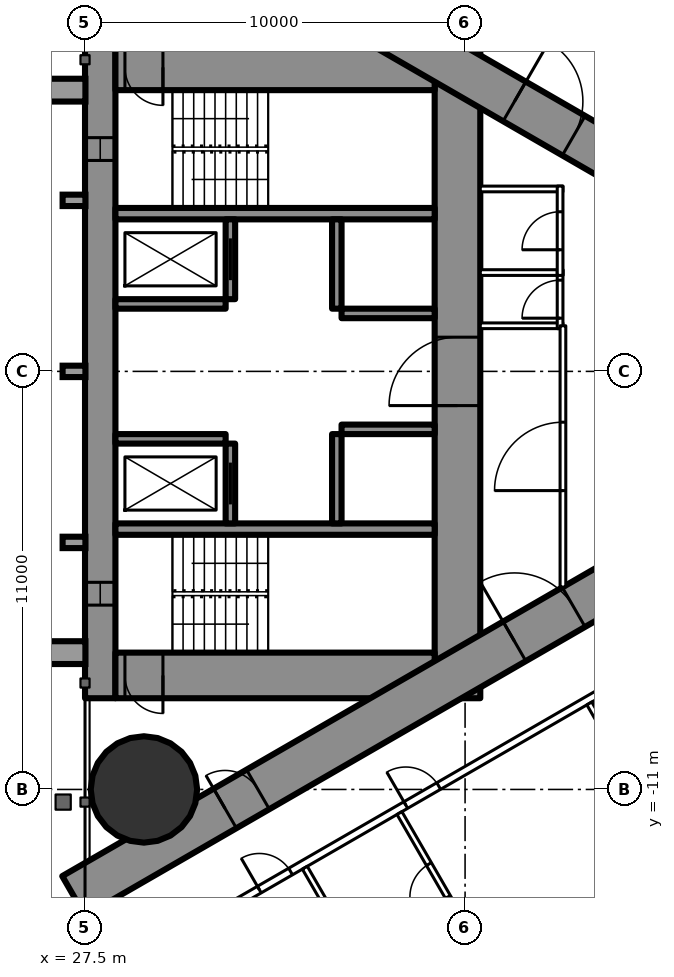
"""IFC4 building model, lengths in metres.
Left out: names, types, materials, properties, quantities, classifications, styles, units other than length and angle.
Written with IfcOpenShell. Run it as: python <this file> out.ifc"""

import sys

from ifc_helpers import new_model, si_unit, direction, frame, frame_2d, origin, origin_2d, place, context, subcontext, project, spatial, rectangle, circle, extrude, element, fill, save


model = new_model("IFC4")
c1 = context("Model", 3, precision=1e-05, world=origin(), true_north=direction((0.0, 1.0)))
c2 = subcontext(c1, "Body", "Model", "MODEL_VIEW")
j1 = project(units=[si_unit("LENGTHUNIT", "METRE"), si_unit("PLANEANGLEUNIT", "RADIAN")], contexts=[c1])
p1 = place(None, origin())
s1 = spatial("IfcSite", under=j1, at=p1, CompositionType="ELEMENT")
p2 = place(p1, origin())
s2 = spatial("IfcBuilding", under=s1, at=p2, CompositionType="ELEMENT")
p3 = place(p2, frame((0.0, 0.0, 170.3)))
s3 = spatial("IfcBuildingStorey", under=s2, at=p3, CompositionType="ELEMENT", Elevation=170.3)
p4 = place(p3, frame((29.05, -11.0, 0.0), z_axis=(0.0, 0.0, 1.0), x_axis=(1.0, 0.0, 0.0)))
e1 = element("IfcColumn", 1, at=p4, inside=s3, PredefinedType="COLUMN", context=c2, shape_type="SweptSolid", body=[
    extrude(circle(Radius=1.4, at=origin_2d()), origin(), (0.0, 0.0, 1.0), 3.5),
])
p5 = place(p3, frame((27.9, -8.6, 0.0), z_axis=(0.0, 0.0, 1.0), x_axis=(0.0, 1.0, 0.0)))
e2 = element("IfcWall", 2, at=p5, inside=s3, PredefinedType="SHEAR", context=c2, shape_type="SweptSolid", body=[
    extrude(rectangle(XDim=17.2, YDim=0.8, at=frame_2d((8.6, 0.0))), origin(), (0.0, 0.0, 1.0), 3.5),
])
p6 = place(p5, frame((2.45, 0.0, 0.6)))
e3 = element("IfcOpeningElement", 3, at=p6, cuts=e2, PredefinedType="OPENING", context=c2, shape_type="SweptSolid", body=[
    extrude(rectangle(XDim=0.6, YDim=2.1, at=frame_2d((0.3, 1.05))), frame((0.0, 0.41, 0.0), z_axis=(0.0, -1.0, 0.0), x_axis=(1.0, 0.0, 0.0)), (0.0, 0.0, 1.0), 0.82),
])
p7 = place(p5, frame((14.15, 0.0, 0.6)))
e4 = element("IfcOpeningElement", 4, at=p7, cuts=e2, PredefinedType="OPENING", context=c2, shape_type="SweptSolid", body=[
    extrude(rectangle(XDim=0.6, YDim=2.1, at=frame_2d((0.3, 1.05))), frame((0.0, 0.41, 0.0), z_axis=(0.0, -1.0, 0.0), x_axis=(1.0, 0.0, 0.0)), (0.0, 0.0, 1.0), 0.82),
])
p8 = place(p3, frame((37.3, -8.6, 0.0), z_axis=(0.0, 0.0, 1.0), x_axis=(0.0, 1.0, 0.0)))
e5 = element("IfcWall", 5, at=p8, inside=s3, PredefinedType="SHEAR", context=c2, shape_type="SweptSolid", body=[
    extrude(rectangle(XDim=17.2, YDim=1.2, at=frame_2d((8.6, 0.0))), origin(), (0.0, 0.0, 1.0), 3.5),
])
p9 = place(p8, frame((7.7, 0.0, 0.0)))
e6 = element("IfcOpeningElement", 6, at=p9, cuts=e5, PredefinedType="OPENING", context=c2, shape_type="SweptSolid", body=[
    extrude(rectangle(XDim=1.8, YDim=2.2, at=frame_2d((0.9, 1.1))), frame((0.0, 0.61, 0.0), z_axis=(0.0, -1.0, 0.0), x_axis=(1.0, 0.0, 0.0)), (0.0, 0.0, 1.0), 1.22),
])
p10 = place(p3, frame((28.3, -8.0, 0.0), z_axis=(0.0, 0.0, 1.0), x_axis=(1.0, 0.0, 0.0)))
e7 = element("IfcWall", 7, at=p10, inside=s3, PredefinedType="SHEAR", context=c2, shape_type="SweptSolid", body=[
    extrude(rectangle(XDim=8.4, YDim=1.2, at=frame_2d((4.2, 0.0))), origin(), (0.0, 0.0, 1.0), 3.5),
])
p11 = place(p10, frame((0.25, 0.0, 0.0)))
e8 = element("IfcOpeningElement", 8, at=p11, cuts=e7, PredefinedType="OPENING", context=c2, shape_type="SweptSolid", body=[
    extrude(rectangle(XDim=1.0, YDim=2.2, at=frame_2d((0.5, 1.1))), frame((0.0, 0.61, 0.0), z_axis=(0.0, -1.0, 0.0), x_axis=(1.0, 0.0, 0.0)), (0.0, 0.0, 1.0), 1.22),
])
p12 = place(p3, frame((28.3, 8.0, 0.0), z_axis=(0.0, 0.0, 1.0), x_axis=(1.0, 0.0, 0.0)))
e9 = element("IfcWall", 9, at=p12, inside=s3, PredefinedType="SHEAR", context=c2, shape_type="SweptSolid", body=[
    extrude(rectangle(XDim=8.4, YDim=1.2, at=frame_2d((4.2, 0.0))), origin(), (0.0, 0.0, 1.0), 3.5),
])
p13 = place(p12, frame((0.25, 0.0, 0.0)))
e10 = element("IfcOpeningElement", 10, at=p13, cuts=e9, PredefinedType="OPENING", context=c2, shape_type="SweptSolid", body=[
    extrude(rectangle(XDim=1.0, YDim=2.2, at=frame_2d((0.5, 1.1))), frame((0.0, 0.61, 0.0), z_axis=(0.0, -1.0, 0.0), x_axis=(1.0, 0.0, 0.0)), (0.0, 0.0, 1.0), 1.22),
])
for number, where, z_axis, x_axis in (
    (11, (28.3, -4.15, 0.0), (0.0, 0.0, 1.0), (1.0, 0.0, 0.0)),
    (12, (28.3, 4.15, 0.0), (0.0, 0.0, 1.0), (1.0, 0.0, 0.0)),
):
    element("IfcWall", number, at=place(p3, frame(where, z_axis=z_axis, x_axis=x_axis)), inside=s3, PredefinedType="SHEAR", context=c2, shape_type="SweptSolid", body=[
        extrude(rectangle(XDim=8.4, YDim=0.3, at=frame_2d((4.2, 0.0))), origin(), (0.0, 0.0, 1.0), 3.5),
    ])
p14 = place(p3, frame((31.325, -4.0, 0.0), z_axis=(0.0, 0.0, 1.0), x_axis=(0.0, 1.0, 0.0)))
e13 = element("IfcWall", 13, at=p14, inside=s3, PredefinedType="SHEAR", context=c2, shape_type="SweptSolid", body=[
    extrude(rectangle(XDim=2.1, YDim=0.25, at=frame_2d((1.05, 0.0))), origin(), (0.0, 0.0, 1.0), 3.5),
])
p15 = place(p14, frame((0.5, 0.0, 0.0)))
e14 = element("IfcOpeningElement", 14, at=p15, cuts=e13, PredefinedType="OPENING", context=c2, shape_type="SweptSolid", body=[
    extrude(rectangle(XDim=1.1, YDim=2.2, at=frame_2d((0.55, 1.1))), frame((0.0, 0.135, 0.0), z_axis=(0.0, -1.0, 0.0), x_axis=(1.0, 0.0, 0.0)), (0.0, 0.0, 1.0), 0.27),
])
p16 = place(p3, frame((34.125, -4.0, 0.0), z_axis=(0.0, 0.0, 1.0), x_axis=(0.0, 1.0, 0.0)))
e15 = element("IfcWall", 15, at=p16, inside=s3, PredefinedType="SHEAR", context=c2, shape_type="SweptSolid", body=[
    extrude(rectangle(XDim=2.35, YDim=0.25, at=frame_2d((1.175, 0.0))), origin(), (0.0, 0.0, 1.0), 3.5),
])
p17 = place(p3, frame((28.3, -1.775, 0.0), z_axis=(0.0, 0.0, 1.0), x_axis=(1.0, 0.0, 0.0)))
e16 = element("IfcWall", 16, at=p17, inside=s3, PredefinedType="SHEAR", context=c2, shape_type="SweptSolid", body=[
    extrude(rectangle(XDim=2.9, YDim=0.25, at=frame_2d((1.45, 0.0))), origin(), (0.0, 0.0, 1.0), 3.5),
])
p18 = place(p3, frame((34.25, -1.525, 0.0), z_axis=(0.0, 0.0, 1.0), x_axis=(1.0, 0.0, 0.0)))
e17 = element("IfcWall", 17, at=p18, inside=s3, PredefinedType="SHEAR", context=c2, shape_type="SweptSolid", body=[
    extrude(rectangle(XDim=2.45, YDim=0.25, at=frame_2d((1.225, 0.0))), origin(), (0.0, 0.0, 1.0), 3.5),
])
p19 = place(p3, frame((31.325, 1.9, 0.0), z_axis=(0.0, 0.0, 1.0), x_axis=(0.0, 1.0, 0.0)))
e18 = element("IfcWall", 18, at=p19, inside=s3, PredefinedType="SHEAR", context=c2, shape_type="SweptSolid", body=[
    extrude(rectangle(XDim=2.1, YDim=0.25, at=frame_2d((1.05, 0.0))), origin(), (0.0, 0.0, 1.0), 3.5),
])
p20 = place(p19, frame((0.5, 0.0, 0.0)))
e19 = element("IfcOpeningElement", 19, at=p20, cuts=e18, PredefinedType="OPENING", context=c2, shape_type="SweptSolid", body=[
    extrude(rectangle(XDim=1.1, YDim=2.2, at=frame_2d((0.55, 1.1))), frame((0.0, 0.135, 0.0), z_axis=(0.0, -1.0, 0.0), x_axis=(1.0, 0.0, 0.0)), (0.0, 0.0, 1.0), 0.27),
])
p21 = place(p3, frame((34.125, 1.65, 0.0), z_axis=(0.0, 0.0, 1.0), x_axis=(0.0, 1.0, 0.0)))
e20 = element("IfcWall", 20, at=p21, inside=s3, PredefinedType="SHEAR", context=c2, shape_type="SweptSolid", body=[
    extrude(rectangle(XDim=2.35, YDim=0.25, at=frame_2d((1.175, 0.0))), origin(), (0.0, 0.0, 1.0), 3.5),
])
p22 = place(p3, frame((28.3, 1.775, 0.0), z_axis=(0.0, 0.0, 1.0), x_axis=(1.0, 0.0, 0.0)))
e21 = element("IfcWall", 21, at=p22, inside=s3, PredefinedType="SHEAR", context=c2, shape_type="SweptSolid", body=[
    extrude(rectangle(XDim=2.9, YDim=0.25, at=frame_2d((1.45, 0.0))), origin(), (0.0, 0.0, 1.0), 3.5),
])
p23 = place(p3, frame((34.25, 1.525, 0.0), z_axis=(0.0, 0.0, 1.0), x_axis=(1.0, 0.0, 0.0)))
e22 = element("IfcWall", 22, at=p23, inside=s3, PredefinedType="SHEAR", context=c2, shape_type="SweptSolid", body=[
    extrude(rectangle(XDim=2.45, YDim=0.25, at=frame_2d((1.225, 0.0))), origin(), (0.0, 0.0, 1.0), 3.5),
])
p24 = place(p3, frame((27.2, -13.8, 0.0), z_axis=(0.0, 0.0, 1.0), x_axis=(0.866027159892, 0.499996958321, 0.0)))
e23 = element("IfcWall", 23, at=p24, inside=s3, PredefinedType="SHEAR", context=c2, shape_type="SweptSolid", body=[
    extrude(rectangle(XDim=27.947, YDim=1.2, at=frame_2d((13.973, 0.0))), origin(), (0.0, 0.0, 1.0), 3.5),
])
p25 = place(p24, frame((4.6, 0.0, 0.0)))
e24 = element("IfcOpeningElement", 24, at=p25, cuts=e23, PredefinedType="OPENING", context=c2, shape_type="SweptSolid", body=[
    extrude(rectangle(XDim=1.0, YDim=2.2, at=frame_2d((0.5, 1.1))), frame((0.0, 0.61, 0.0), z_axis=(0.0, -1.0, 0.0), x_axis=(1.0, 0.0, 0.0)), (0.0, 0.0, 1.0), 1.22),
])
p26 = place(p24, frame((13.395, 0.0, 0.0)))
e25 = element("IfcOpeningElement", 25, at=p26, cuts=e23, PredefinedType="OPENING", context=c2, shape_type="SweptSolid", body=[
    extrude(rectangle(XDim=1.8, YDim=2.2, at=frame_2d((0.9, 1.1))), frame((0.0, 0.61, 0.0), z_axis=(0.0, -1.0, 0.0), x_axis=(1.0, 0.0, 0.0)), (0.0, 0.0, 1.0), 1.22),
])
p27 = place(p3, frame((27.2, 13.8, 0.0), z_axis=(0.0, 0.0, 1.0), x_axis=(0.866024515034, -0.500001539357, 0.0)))
e26 = element("IfcWall", 26, at=p27, inside=s3, PredefinedType="SHEAR", context=c2, shape_type="SweptSolid", body=[
    extrude(rectangle(XDim=26.907, YDim=1.2, at=frame_2d((13.454, 0.0))), origin(), (0.0, 0.0, 1.0), 3.5),
])
p28 = place(p27, frame((4.6, 0.0, 0.0)))
e27 = element("IfcOpeningElement", 27, at=p28, cuts=e26, PredefinedType="OPENING", context=c2, shape_type="SweptSolid", body=[
    extrude(rectangle(XDim=1.0, YDim=2.2, at=frame_2d((0.5, 1.1))), frame((0.0, 0.61, 0.0), z_axis=(0.0, -1.0, 0.0), x_axis=(1.0, 0.0, 0.0)), (0.0, 0.0, 1.0), 1.22),
])
p29 = place(p27, frame((13.395, 0.0, 0.0)))
e28 = element("IfcOpeningElement", 28, at=p29, cuts=e26, PredefinedType="OPENING", context=c2, shape_type="SweptSolid", body=[
    extrude(rectangle(XDim=1.8, YDim=2.2, at=frame_2d((0.9, 1.1))), frame((0.0, 0.61, 0.0), z_axis=(0.0, -1.0, 0.0), x_axis=(1.0, 0.0, 0.0)), (0.0, 0.0, 1.0), 1.22),
])
p30 = place(p3, frame((27.959, -16.017, 0.0), z_axis=(0.0, 0.0, 1.0), x_axis=(0.866024151371, 0.500002169237, 0.0)))
e29 = element("IfcWall", 29, at=p30, inside=s3, PredefinedType="PARTITIONING", context=c2, shape_type="SweptSolid", body=[
    extrude(rectangle(XDim=32.034, YDim=0.2, at=frame_2d((16.017, 0.0))), origin(), (0.0, 0.0, 1.0), 3.25),
])
p31 = place(p30, frame((4.765, 0.0, 0.0)))
e30 = element("IfcOpeningElement", 30, at=p31, cuts=e29, PredefinedType="OPENING", context=c2, shape_type="SweptSolid", body=[
    extrude(rectangle(XDim=0.95, YDim=2.2, at=frame_2d((0.475, 1.1))), frame((0.0, 0.11, 0.0), z_axis=(0.0, -1.0, 0.0), x_axis=(1.0, 0.0, 0.0)), (0.0, 0.0, 1.0), 0.22),
])
p32 = place(p30, frame((9.215, 0.0, 0.0)))
e31 = element("IfcOpeningElement", 31, at=p32, cuts=e29, PredefinedType="OPENING", context=c2, shape_type="SweptSolid", body=[
    extrude(rectangle(XDim=1.0, YDim=2.2, at=frame_2d((0.5, 1.1))), frame((0.0, 0.11, 0.0), z_axis=(0.0, -1.0, 0.0), x_axis=(1.0, 0.0, 0.0)), (0.0, 0.0, 1.0), 0.22),
])
p33 = place(p30, frame((19.725, 0.0, 0.0)))
e32 = element("IfcOpeningElement", 32, at=p33, cuts=e29, PredefinedType="OPENING", context=c2, shape_type="SweptSolid", body=[
    extrude(rectangle(XDim=0.95, YDim=2.2, at=frame_2d((0.475, 1.1))), frame((0.0, 0.11, 0.0), z_axis=(0.0, -1.0, 0.0), x_axis=(1.0, 0.0, 0.0)), (0.0, 0.0, 1.0), 0.22),
])
p34 = place(p30, frame((26.125, 0.0, 0.0)))
e33 = element("IfcOpeningElement", 33, at=p34, cuts=e29, PredefinedType="OPENING", context=c2, shape_type="SweptSolid", body=[
    extrude(rectangle(XDim=0.95, YDim=2.2, at=frame_2d((0.475, 1.1))), frame((0.0, 0.11, 0.0), z_axis=(0.0, -1.0, 0.0), x_axis=(1.0, 0.0, 0.0)), (0.0, 0.0, 1.0), 0.22),
])
p35 = place(p30, frame((28.106, 0.0, 0.0)))
e34 = element("IfcOpeningElement", 34, at=p35, cuts=e29, PredefinedType="OPENING", context=c2, shape_type="SweptSolid", body=[
    extrude(rectangle(XDim=0.95, YDim=2.2, at=frame_2d((0.475, 1.1))), frame((0.0, 0.11, 0.0), z_axis=(0.0, -1.0, 0.0), x_axis=(1.0, 0.0, 0.0)), (0.0, 0.0, 1.0), 0.22),
])
p36 = place(p3, frame((33.284, -13.059, 0.0), z_axis=(0.0, 0.0, 1.0), x_axis=(0.499985904184, -0.866033541855, 0.0)))
e35 = element("IfcWall", 35, at=p36, inside=s3, PredefinedType="PARTITIONING", context=c2, shape_type="SweptSolid", body=[
    extrude(rectangle(XDim=9.385, YDim=0.15, at=frame_2d((4.693, 0.0))), origin(), (0.0, 0.0, 1.0), 3.25),
])
p37 = place(p3, frame((40.769, -8.737, 0.0), z_axis=(0.0, 0.0, 1.0), x_axis=(0.500013115284, -0.866017831539, 0.0)))
e36 = element("IfcWall", 36, at=p37, inside=s3, PredefinedType="PARTITIONING", context=c2, shape_type="SweptSolid", body=[
    extrude(rectangle(XDim=7.198, YDim=0.15, at=frame_2d((3.599, 0.0))), origin(), (0.0, 0.0, 1.0), 2.3),
])
p38 = place(p3, frame((35.773, -11.621, 0.0), z_axis=(0.0, 0.0, 1.0), x_axis=(0.49998411664, -0.866034573852, 0.0)))
e37 = element("IfcWall", 37, at=p38, inside=s3, PredefinedType="PARTITIONING", context=c2, shape_type="SweptSolid", body=[
    extrude(rectangle(XDim=2.8, YDim=0.15, at=frame_2d((1.4, 0.0))), origin(), (0.0, 0.0, 1.0), 3.25),
])
p39 = place(p38, frame((1.55, 0.0, 0.0)))
e38 = element("IfcOpeningElement", 38, at=p39, cuts=e37, PredefinedType="OPENING", context=c2, shape_type="SweptSolid", body=[
    extrude(rectangle(XDim=1.0, YDim=2.2, at=frame_2d((0.5, 1.1))), frame((0.0, 0.085, 0.0), z_axis=(0.0, -1.0, 0.0), x_axis=(1.0, 0.0, 0.0)), (0.0, 0.0, 1.0), 0.17),
])
for number, where, z_axis, x_axis in (
    (39, (37.9, 1.2, 0.0), (0.0, 0.0, 1.0), (1.0, 0.0, 0.0)),
    (40, (37.9, 2.6, 0.0), (0.0, 0.0, 1.0), (1.0, 0.0, 0.0)),
    (41, (37.9, 4.8, 0.0), (0.0, 0.0, 1.0), (1.0, 0.0, 0.0)),
):
    element("IfcWall", number, at=place(p3, frame(where, z_axis=z_axis, x_axis=x_axis)), inside=s3, PredefinedType="PARTITIONING", context=c2, shape_type="SweptSolid", body=[
        extrude(rectangle(XDim=2.175, YDim=0.15, at=frame_2d((1.087, 0.0))), origin(), (0.0, 0.0, 1.0), 3.25),
    ])
p40 = place(p3, frame((40.0, 1.125, 0.0), z_axis=(0.0, 0.0, 1.0), x_axis=(0.0, 1.0, 0.0)))
e42 = element("IfcWall", 42, at=p40, inside=s3, PredefinedType="PARTITIONING", context=c2, shape_type="SweptSolid", body=[
    extrude(rectangle(XDim=1.55, YDim=0.15, at=frame_2d((0.775, 0.0))), origin(), (0.0, 0.0, 1.0), 3.25),
])
p41 = place(p40, frame((0.275, 0.0, 0.0)))
e43 = element("IfcOpeningElement", 43, at=p41, cuts=e42, PredefinedType="OPENING", context=c2, shape_type="SweptSolid", body=[
    extrude(rectangle(XDim=1.0, YDim=2.2, at=frame_2d((0.5, 1.1))), frame((0.0, 0.085, 0.0), z_axis=(0.0, -1.0, 0.0), x_axis=(1.0, 0.0, 0.0)), (0.0, 0.0, 1.0), 0.17),
])
p42 = place(p3, frame((40.0, 2.525, 0.0), z_axis=(0.0, 0.0, 1.0), x_axis=(0.0, 1.0, 0.0)))
e44 = element("IfcWall", 44, at=p42, inside=s3, PredefinedType="PARTITIONING", context=c2, shape_type="SweptSolid", body=[
    extrude(rectangle(XDim=2.35, YDim=0.15, at=frame_2d((1.175, 0.0))), origin(), (0.0, 0.0, 1.0), 3.25),
])
p43 = place(p42, frame((0.675, 0.0, 0.0)))
e45 = element("IfcOpeningElement", 45, at=p43, cuts=e44, PredefinedType="OPENING", context=c2, shape_type="SweptSolid", body=[
    extrude(rectangle(XDim=1.0, YDim=2.2, at=frame_2d((0.5, 1.1))), frame((0.0, 0.085, 0.0), z_axis=(0.0, -1.0, 0.0), x_axis=(1.0, 0.0, 0.0)), (0.0, 0.0, 1.0), 0.17),
])
p44 = place(p3, frame((40.075, -5.674, 0.0), z_axis=(0.0, 0.0, 1.0), x_axis=(0.0, 1.0, 0.0)))
e46 = element("IfcWall", 46, at=p44, inside=s3, PredefinedType="PARTITIONING", context=c2, shape_type="SweptSolid", body=[
    extrude(rectangle(XDim=6.874, YDim=0.15, at=frame_2d((3.437, 0.0))), origin(), (0.0, 0.0, 1.0), 3.25),
])
p45 = place(p44, frame((2.537, 0.0, 0.0)))
e47 = element("IfcOpeningElement", 47, at=p45, cuts=e46, PredefinedType="OPENING", context=c2, shape_type="SweptSolid", body=[
    extrude(rectangle(XDim=1.8, YDim=2.2, at=frame_2d((0.9, 1.1))), frame((0.0, 0.085, 0.0), z_axis=(0.0, -1.0, 0.0), x_axis=(1.0, 0.0, 0.0)), (0.0, 0.0, 1.0), 0.17),
])
p46 = place(p31, origin())
e48 = element("IfcDoor", 48, at=p46, inside=s3, OperationType="SINGLE_SWING_LEFT", PredefinedType="DOOR", context=c2, shape_type="SweptSolid", body=[
    extrude(rectangle(XDim=0.95, YDim=2.2, at=frame_2d((0.475, 1.1))), frame((0.0, 0.025, 0.0), z_axis=(0.0, -1.0, 0.0), x_axis=(1.0, 0.0, 0.0)), (0.0, 0.0, 1.0), 0.05),
])
fill(e30, e48)
p47 = place(p39, origin())
e49 = element("IfcDoor", 49, at=p47, inside=s3, OperationType="SINGLE_SWING_RIGHT", PredefinedType="DOOR", context=c2, shape_type="SweptSolid", body=[
    extrude(rectangle(XDim=1.0, YDim=2.2, at=frame_2d((0.5, 1.1))), frame((0.0, 0.025, 0.0), z_axis=(0.0, -1.0, 0.0), x_axis=(1.0, 0.0, 0.0)), (0.0, 0.0, 1.0), 0.05),
])
fill(e38, e49)
p48 = place(p32, origin())
e50 = element("IfcDoor", 50, at=p48, inside=s3, OperationType="SINGLE_SWING_LEFT", PredefinedType="DOOR", context=c2, shape_type="SweptSolid", body=[
    extrude(rectangle(XDim=1.0, YDim=2.2, at=frame_2d((0.5, 1.1))), frame((0.0, 0.025, 0.0), z_axis=(0.0, -1.0, 0.0), x_axis=(1.0, 0.0, 0.0)), (0.0, 0.0, 1.0), 0.05),
])
fill(e31, e50)
p49 = place(p41, origin())
e51 = element("IfcDoor", 51, at=p49, inside=s3, OperationType="SINGLE_SWING_LEFT", PredefinedType="DOOR", context=c2, shape_type="SweptSolid", body=[
    extrude(rectangle(XDim=1.0, YDim=2.2, at=frame_2d((0.5, 1.1))), frame((0.0, 0.025, 0.0), z_axis=(0.0, -1.0, 0.0), x_axis=(1.0, 0.0, 0.0)), (0.0, 0.0, 1.0), 0.05),
])
fill(e43, e51)
p50 = place(p43, origin())
e52 = element("IfcDoor", 52, at=p50, inside=s3, OperationType="SINGLE_SWING_LEFT", PredefinedType="DOOR", context=c2, shape_type="SweptSolid", body=[
    extrude(rectangle(XDim=1.0, YDim=2.2, at=frame_2d((0.5, 1.1))), frame((0.0, 0.025, 0.0), z_axis=(0.0, -1.0, 0.0), x_axis=(1.0, 0.0, 0.0)), (0.0, 0.0, 1.0), 0.05),
])
fill(e45, e52)
p51 = place(p45, origin())
e53 = element("IfcDoor", 53, at=p51, inside=s3, OperationType="DOUBLE_DOOR_SINGLE_SWING", PredefinedType="DOOR", context=c2, shape_type="SweptSolid", body=[
    extrude(rectangle(XDim=1.8, YDim=2.2, at=frame_2d((0.9, 1.1))), frame((0.0, 0.025, 0.0), z_axis=(0.0, -1.0, 0.0), x_axis=(1.0, 0.0, 0.0)), (0.0, 0.0, 1.0), 0.05),
])
fill(e47, e53)
p52 = place(p25, origin())
e54 = element("IfcDoor", 54, at=p52, inside=s3, OperationType="SINGLE_SWING_LEFT", PredefinedType="DOOR", context=c2, shape_type="SweptSolid", body=[
    extrude(rectangle(XDim=1.0, YDim=2.2, at=frame_2d((0.5, 1.1))), frame((0.0, 0.025, 0.0), z_axis=(0.0, -1.0, 0.0), x_axis=(1.0, 0.0, 0.0)), (0.0, 0.0, 1.0), 0.05),
])
fill(e24, e54)
p53 = place(p26, origin())
e55 = element("IfcDoor", 55, at=p53, inside=s3, OperationType="DOUBLE_DOOR_SINGLE_SWING", PredefinedType="DOOR", context=c2, shape_type="SweptSolid", body=[
    extrude(rectangle(XDim=1.8, YDim=2.2, at=frame_2d((0.9, 1.1))), frame((0.0, 0.025, 0.0), z_axis=(0.0, -1.0, 0.0), x_axis=(1.0, 0.0, 0.0)), (0.0, 0.0, 1.0), 0.05),
])
fill(e25, e55)
p54 = place(p29, origin())
e56 = element("IfcDoor", 56, at=p54, inside=s3, OperationType="DOUBLE_DOOR_SINGLE_SWING", PredefinedType="DOOR", context=c2, shape_type="SweptSolid", body=[
    extrude(rectangle(XDim=1.8, YDim=2.2, at=frame_2d((0.9, 1.1))), frame((0.0, 0.025, 0.0), z_axis=(0.0, -1.0, 0.0), x_axis=(1.0, 0.0, 0.0)), (0.0, 0.0, 1.0), 0.05),
])
fill(e28, e56)
p55 = place(p9, origin())
e57 = element("IfcDoor", 57, at=p55, inside=s3, OperationType="DOUBLE_DOOR_SINGLE_SWING", PredefinedType="DOOR", context=c2, shape_type="SweptSolid", body=[
    extrude(rectangle(XDim=1.8, YDim=2.2, at=frame_2d((0.9, 1.1))), frame((0.0, 0.025, 0.0), z_axis=(0.0, -1.0, 0.0), x_axis=(1.0, 0.0, 0.0)), (0.0, 0.0, 1.0), 0.05),
])
fill(e6, e57)
p56 = place(p11, origin())
e58 = element("IfcDoor", 58, at=p56, inside=s3, OperationType="SINGLE_SWING_RIGHT", PredefinedType="DOOR", context=c2, shape_type="SweptSolid", body=[
    extrude(rectangle(XDim=1.0, YDim=2.2, at=frame_2d((0.5, 1.1))), frame((0.0, 0.025, 0.0), z_axis=(0.0, -1.0, 0.0), x_axis=(1.0, 0.0, 0.0)), (0.0, 0.0, 1.0), 0.05),
])
fill(e8, e58)
p57 = place(p13, origin())
e59 = element("IfcDoor", 59, at=p57, inside=s3, OperationType="SINGLE_SWING_RIGHT", PredefinedType="DOOR", context=c2, shape_type="SweptSolid", body=[
    extrude(rectangle(XDim=1.0, YDim=2.2, at=frame_2d((0.5, 1.1))), frame((0.0, 0.025, 0.0), z_axis=(0.0, -1.0, 0.0), x_axis=(1.0, 0.0, 0.0)), (0.0, 0.0, 1.0), 0.05),
])
fill(e10, e59)
p58 = place(p15, origin())
e60 = element("IfcDoor", 60, at=p58, inside=s3, OperationType="SLIDING_TO_LEFT", PredefinedType="USERDEFINED", context=c2, shape_type="SweptSolid", body=[
    extrude(rectangle(XDim=1.1, YDim=2.2, at=frame_2d((0.55, 1.1))), frame((0.0, 0.025, 0.0), z_axis=(0.0, -1.0, 0.0), x_axis=(1.0, 0.0, 0.0)), (0.0, 0.0, 1.0), 0.05),
])
fill(e14, e60)
p59 = place(p20, origin())
e61 = element("IfcDoor", 61, at=p59, inside=s3, OperationType="SLIDING_TO_LEFT", PredefinedType="USERDEFINED", context=c2, shape_type="SweptSolid", body=[
    extrude(rectangle(XDim=1.1, YDim=2.2, at=frame_2d((0.55, 1.1))), frame((0.0, 0.025, 0.0), z_axis=(0.0, -1.0, 0.0), x_axis=(1.0, 0.0, 0.0)), (0.0, 0.0, 1.0), 0.05),
])
fill(e19, e61)
p60 = place(p6, origin())
e62 = element("IfcWindow", 62, at=p60, inside=s3, PartitioningType="SINGLE_PANEL", PredefinedType="WINDOW", context=c2, shape_type="SweptSolid", body=[
    extrude(rectangle(XDim=0.6, YDim=2.1, at=frame_2d((0.3, 1.05))), frame((0.0, 0.03, 0.0), z_axis=(0.0, -1.0, 0.0), x_axis=(1.0, 0.0, 0.0)), (0.0, 0.0, 1.0), 0.06),
])
fill(e3, e62)
p61 = place(p7, origin())
e63 = element("IfcWindow", 63, at=p61, inside=s3, PartitioningType="SINGLE_PANEL", PredefinedType="WINDOW", context=c2, shape_type="SweptSolid", body=[
    extrude(rectangle(XDim=0.6, YDim=2.1, at=frame_2d((0.3, 1.05))), frame((0.0, 0.03, 0.0), z_axis=(0.0, -1.0, 0.0), x_axis=(1.0, 0.0, 0.0)), (0.0, 0.0, 1.0), 0.06),
])
fill(e4, e63)
save(model, sys.argv[1])
